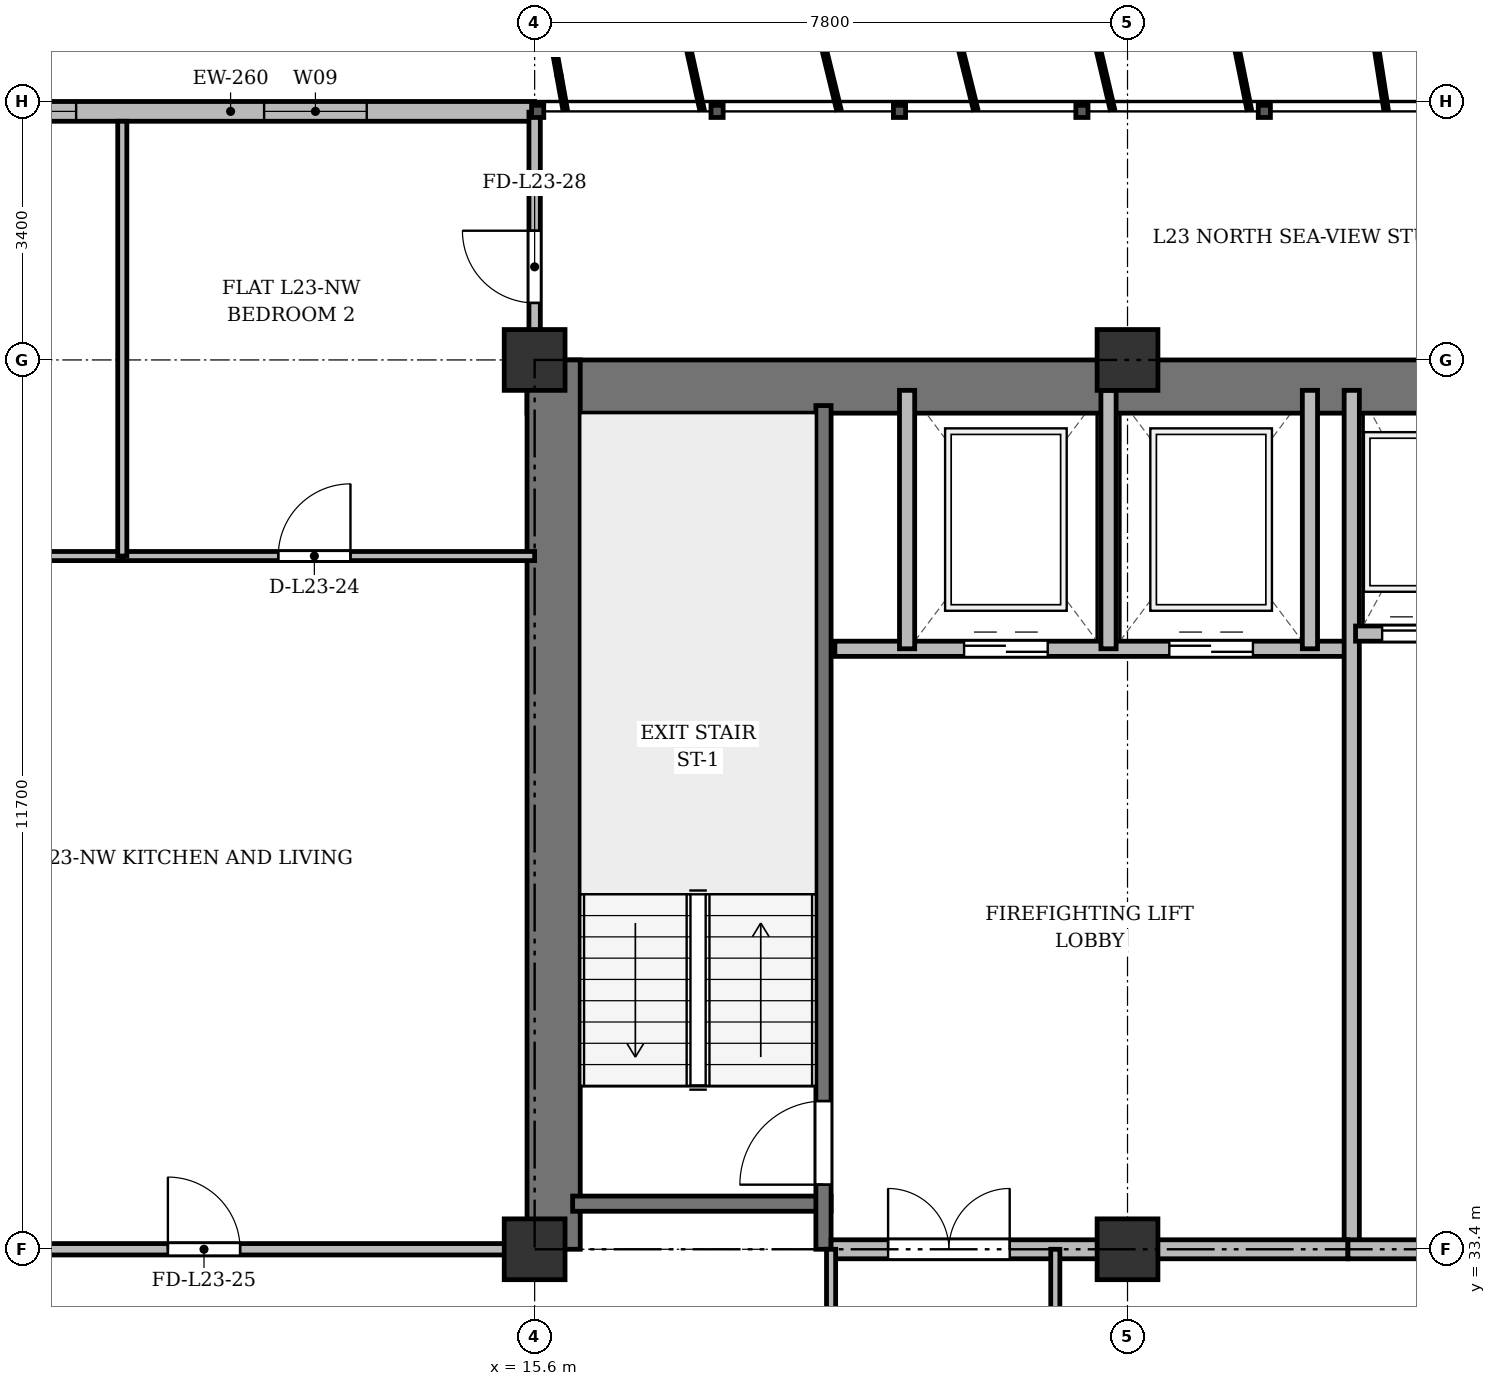
"""IFC4 building model, lengths in metres.
Left out: names, types, materials, properties, quantities, classifications, styles, units other than length and angle.
Written with IfcOpenShell. Run it as: python <this file> out.ifc"""

import sys

from ifc_helpers import new_model, si_unit, direction, frame, frame_2d, origin, origin_2d, place, context, subcontext, project, spatial, rectangle, extrude, source, transform, mapped, element, fill, save


model = new_model("IFC4")
c1 = context("Model", 3, precision=1e-05, world=origin(), true_north=direction((0.0, 1.0)))
c2 = subcontext(c1, "Body", "Model", "MODEL_VIEW")
j1 = project(units=[si_unit("LENGTHUNIT", "METRE"), si_unit("PLANEANGLEUNIT", "RADIAN")], contexts=[c1])
p1 = place(None, origin())
s1 = spatial("IfcSite", under=j1, at=p1, CompositionType="ELEMENT")
p2 = place(p1, origin())
s2 = spatial("IfcBuilding", under=s1, at=p2, CompositionType="ELEMENT")
p3 = place(p2, frame((0.0, 0.0, 92.5)))
s3 = spatial("IfcBuildingStorey", under=s2, at=p3, CompositionType="ELEMENT", Elevation=92.5)
m1 = source(origin(), c2, "Body", "SweptSolid", [
    extrude(rectangle(XDim=0.8, YDim=0.8, at=origin_2d()), origin(), (0.0, 0.0, 1.0), 3.6),
])
for number, where, z_axis, x_axis in (
    (1, (15.6, 33.4, 0.0), (0.0, 0.0, 1.0), (1.0, 0.0, 0.0)),
    (2, (15.6, 45.1, 0.0), (0.0, 0.0, 1.0), (1.0, 0.0, 0.0)),
    (3, (23.4, 33.4, 0.0), (0.0, 0.0, 1.0), (1.0, 0.0, 0.0)),
    (4, (23.4, 45.1, 0.0), (0.0, 0.0, 1.0), (1.0, 0.0, 0.0)),
):
    element("IfcColumn", number, at=place(p3, frame(where, z_axis=z_axis, x_axis=x_axis)), inside=s3, PredefinedType="COLUMN", context=c2, shape_type="MappedRepresentation", body=[
        mapped(m1, transform((0.0, 0.0, 0.0), x_axis=(1.0, 0.0, 0.0), y_axis=(0.0, 1.0, 0.0), z_axis=(0.0, 0.0, 1.0), scale=1.0)),
    ])
p4 = place(p3, frame((7.6, 48.37, 0.0), z_axis=(0.0, 0.0, 1.0), x_axis=(1.0, 0.0, 0.0)))
e5 = element("IfcWall", 5, at=p4, inside=s3, PredefinedType="SOLIDWALL", context=c2, shape_type="SweptSolid", body=[
    extrude(rectangle(XDim=8.0, YDim=0.26, at=frame_2d((4.0, 0.0))), origin(), (0.0, 0.0, 1.0), 3.34),
])
p5 = place(p4, frame((0.768, 0.0, 0.9)))
e6 = element("IfcOpeningElement", 6, at=p5, cuts=e5, PredefinedType="OPENING", context=c2, shape_type="SweptSolid", body=[
    extrude(rectangle(XDim=1.2, YDim=1.65, at=frame_2d((0.6, 0.825))), frame((0.0, 0.14, 0.0), z_axis=(0.0, -1.0, 0.0), x_axis=(1.0, 0.0, 0.0)), (0.0, 0.0, 1.0), 0.28),
])
p6 = place(p4, frame((4.441, 0.0, 0.9)))
e7 = element("IfcOpeningElement", 7, at=p6, cuts=e5, PredefinedType="OPENING", context=c2, shape_type="SweptSolid", body=[
    extrude(rectangle(XDim=1.35, YDim=1.5, at=frame_2d((0.675, 0.75))), frame((0.0, 0.14, 0.0), z_axis=(0.0, -1.0, 0.0), x_axis=(1.0, 0.0, 0.0)), (0.0, 0.0, 1.0), 0.28),
])
p7 = place(p3, frame((15.5, 44.75, 0.0), z_axis=(0.0, 0.0, 1.0), x_axis=(1.0, 0.0, 0.0)))
e8 = element("IfcWall", 8, at=p7, inside=s3, PredefinedType="SHEAR", context=c2, shape_type="SweptSolid", body=[
    extrude(rectangle(XDim=43.4, YDim=0.7, at=frame_2d((21.7, 0.0))), origin(), (0.0, 0.0, 1.0), 3.34),
])
p8 = place(p3, frame((15.85, 33.4, 0.0), z_axis=(0.0, 0.0, 1.0), x_axis=(0.0, 1.0, 0.0)))
e9 = element("IfcWall", 9, at=p8, inside=s3, PredefinedType="SHEAR", context=c2, shape_type="SweptSolid", body=[
    extrude(rectangle(XDim=11.7, YDim=0.7, at=frame_2d((5.85, 0.0))), origin(), (0.0, 0.0, 1.0), 3.34),
])
p9 = place(p3, frame((16.1, 34.0, 0.0), z_axis=(0.0, 0.0, 1.0), x_axis=(1.0, 0.0, 0.0)))
e10 = element("IfcWall", 10, at=p9, inside=s3, PredefinedType="SHEAR", context=c2, shape_type="SweptSolid", body=[
    extrude(rectangle(XDim=3.4, YDim=0.2, at=frame_2d((1.7, 0.0))), origin(), (0.0, 0.0, 1.0), 3.34),
])
p10 = place(p3, frame((19.4, 33.4, 0.0), z_axis=(0.0, 0.0, 1.0), x_axis=(0.0, 1.0, 0.0)))
e11 = element("IfcWall", 11, at=p10, inside=s3, PredefinedType="SHEAR", context=c2, shape_type="SweptSolid", body=[
    extrude(rectangle(XDim=11.1, YDim=0.2, at=frame_2d((5.55, 0.0))), origin(), (0.0, 0.0, 1.0), 3.34),
])
p11 = place(p10, frame((0.85, 0.0, 0.0)))
e12 = element("IfcOpeningElement", 12, at=p11, cuts=e11, PredefinedType="OPENING", context=c2, shape_type="SweptSolid", body=[
    extrude(rectangle(XDim=1.1, YDim=2.15, at=frame_2d((0.55, 1.075))), frame((0.0, 0.11, 0.0), z_axis=(0.0, -1.0, 0.0), x_axis=(1.0, 0.0, 0.0)), (0.0, 0.0, 1.0), 0.22),
])
p12 = place(p3, frame((19.55, 41.3, 0.0), z_axis=(0.0, 0.0, 1.0), x_axis=(1.0, 0.0, 0.0)))
e13 = element("IfcWall", 13, at=p12, inside=s3, PredefinedType="SOLIDWALL", context=c2, shape_type="SweptSolid", body=[
    extrude(rectangle(XDim=6.75, YDim=0.2, at=frame_2d((3.375, 0.0))), origin(), (0.0, 0.0, 1.0), 3.34),
])
p13 = place(p12, frame((1.7, 0.0, 0.0)))
e14 = element("IfcOpeningElement", 14, at=p13, cuts=e13, PredefinedType="OPENING", context=c2, shape_type="SweptSolid", body=[
    extrude(rectangle(XDim=1.1, YDim=2.15, at=frame_2d((0.55, 1.075))), frame((0.0, 0.11, 0.0), z_axis=(0.0, -1.0, 0.0), x_axis=(1.0, 0.0, 0.0)), (0.0, 0.0, 1.0), 0.22),
])
p14 = place(p12, frame((4.4, 0.0, 0.0)))
e15 = element("IfcOpeningElement", 15, at=p14, cuts=e13, PredefinedType="OPENING", context=c2, shape_type="SweptSolid", body=[
    extrude(rectangle(XDim=1.1, YDim=2.15, at=frame_2d((0.55, 1.075))), frame((0.0, 0.11, 0.0), z_axis=(0.0, -1.0, 0.0), x_axis=(1.0, 0.0, 0.0)), (0.0, 0.0, 1.0), 0.22),
])
for number, where, z_axis, x_axis in (
    (16, (20.5, 41.3, 0.0), (0.0, 0.0, 1.0), (0.0, 1.0, 0.0)),
    (17, (23.15, 41.3, 0.0), (0.0, 0.0, 1.0), (0.0, 1.0, 0.0)),
    (18, (25.8, 41.3, 0.0), (0.0, 0.0, 1.0), (0.0, 1.0, 0.0)),
):
    element("IfcWall", number, at=place(p3, frame(where, z_axis=z_axis, x_axis=x_axis)), inside=s3, PredefinedType="SOLIDWALL", context=c2, shape_type="SweptSolid", body=[
        extrude(rectangle(XDim=3.4, YDim=0.2, at=frame_2d((1.7, 0.0))), origin(), (0.0, 0.0, 1.0), 3.34),
    ])
p15 = place(p3, frame((26.35, 33.4, 0.0), z_axis=(0.0, 0.0, 1.0), x_axis=(0.0, 1.0, 0.0)))
e19 = element("IfcWall", 19, at=p15, inside=s3, PredefinedType="SOLIDWALL", context=c2, shape_type="SweptSolid", body=[
    extrude(rectangle(XDim=11.3, YDim=0.2, at=frame_2d((5.65, 0.0))), origin(), (0.0, 0.0, 1.0), 2.752),
])
p16 = place(p3, frame((19.5, 33.4, 0.0), z_axis=(0.0, 0.0, 1.0), x_axis=(1.0, 0.0, 0.0)))
e20 = element("IfcWall", 20, at=p16, inside=s3, PredefinedType="PARTITIONING", context=c2, shape_type="SweptSolid", body=[
    extrude(rectangle(XDim=6.8, YDim=0.25, at=frame_2d((3.4, 0.0))), origin(), (0.0, 0.0, 1.0), 2.752),
])
p17 = place(p16, frame((0.75, 0.0, 0.0)))
e21 = element("IfcOpeningElement", 21, at=p17, cuts=e20, PredefinedType="OPENING", context=c2, shape_type="SweptSolid", body=[
    extrude(rectangle(XDim=1.6, YDim=2.2, at=frame_2d((0.8, 1.1))), frame((0.0, 0.135, 0.0), z_axis=(0.0, -1.0, 0.0), x_axis=(1.0, 0.0, 0.0)), (0.0, 0.0, 1.0), 0.27),
])
p18 = place(p3, frame((26.4, 41.5, 0.0), z_axis=(0.0, 0.0, 1.0), x_axis=(1.0, 0.0, 0.0)))
e22 = element("IfcWall", 22, at=p18, inside=s3, PredefinedType="SOLIDWALL", context=c2, shape_type="SweptSolid", body=[
    extrude(rectangle(XDim=6.95, YDim=0.2, at=frame_2d((3.475, 0.0))), origin(), (0.0, 0.0, 1.0), 3.34),
])
p19 = place(p18, frame((0.35, 0.0, 0.0)))
e23 = element("IfcOpeningElement", 23, at=p19, cuts=e22, PredefinedType="OPENING", context=c2, shape_type="SweptSolid", body=[
    extrude(rectangle(XDim=1.05, YDim=2.15, at=frame_2d((0.525, 1.075))), frame((0.0, 0.11, 0.0), z_axis=(0.0, -1.0, 0.0), x_axis=(1.0, 0.0, 0.0)), (0.0, 0.0, 1.0), 0.22),
])
p20 = place(p18, frame((2.05, 0.0, 0.0)))
e24 = element("IfcOpeningElement", 24, at=p20, cuts=e22, PredefinedType="OPENING", context=c2, shape_type="SweptSolid", body=[
    extrude(rectangle(XDim=1.05, YDim=2.15, at=frame_2d((0.525, 1.075))), frame((0.0, 0.11, 0.0), z_axis=(0.0, -1.0, 0.0), x_axis=(1.0, 0.0, 0.0)), (0.0, 0.0, 1.0), 0.22),
])
p21 = place(p18, frame((3.75, 0.0, 0.0)))
e25 = element("IfcOpeningElement", 25, at=p21, cuts=e22, PredefinedType="OPENING", context=c2, shape_type="SweptSolid", body=[
    extrude(rectangle(XDim=1.05, YDim=2.15, at=frame_2d((0.525, 1.075))), frame((0.0, 0.11, 0.0), z_axis=(0.0, -1.0, 0.0), x_axis=(1.0, 0.0, 0.0)), (0.0, 0.0, 1.0), 0.22),
])
p22 = place(p18, frame((5.45, 0.0, 0.0)))
e26 = element("IfcOpeningElement", 26, at=p22, cuts=e22, PredefinedType="OPENING", context=c2, shape_type="SweptSolid", body=[
    extrude(rectangle(XDim=1.05, YDim=2.15, at=frame_2d((0.525, 1.075))), frame((0.0, 0.11, 0.0), z_axis=(0.0, -1.0, 0.0), x_axis=(1.0, 0.0, 0.0)), (0.0, 0.0, 1.0), 0.22),
])
p23 = place(p3, frame((26.3, 33.4, 0.0), z_axis=(0.0, 0.0, 1.0), x_axis=(1.0, 0.0, 0.0)))
e27 = element("IfcWall", 27, at=p23, inside=s3, PredefinedType="PARTITIONING", context=c2, shape_type="SweptSolid", body=[
    extrude(rectangle(XDim=20.85, YDim=0.25, at=frame_2d((10.425, 0.0))), origin(), (0.0, 0.0, 1.0), 2.752),
])
p24 = place(p23, frame((9.2, 0.0, 0.0)))
e28 = element("IfcOpeningElement", 28, at=p24, cuts=e27, PredefinedType="OPENING", context=c2, shape_type="SweptSolid", body=[
    extrude(rectangle(XDim=1.6, YDim=2.2, at=frame_2d((0.8, 1.1))), frame((0.0, 0.135, 0.0), z_axis=(0.0, -1.0, 0.0), x_axis=(1.0, 0.0, 0.0)), (0.0, 0.0, 1.0), 0.27),
])
for number, where, z_axis, x_axis in (
    (29, (19.5, 29.8, 0.0), (0.0, 0.0, 1.0), (0.0, 1.0, 0.0)),
    (30, (22.45, 29.8, 0.0), (0.0, 0.0, 1.0), (0.0, 1.0, 0.0)),
):
    element("IfcWall", number, at=place(p3, frame(where, z_axis=z_axis, x_axis=x_axis)), inside=s3, PredefinedType="PARTITIONING", context=c2, shape_type="SweptSolid", body=[
        extrude(rectangle(XDim=3.6, YDim=0.12, at=frame_2d((1.8, 0.0))), origin(), (0.0, 0.0, 1.0), 2.752),
    ])
p25 = place(p3, frame((4.75, 42.52, 0.0), z_axis=(0.0, 0.0, 1.0), x_axis=(1.0, 0.0, 0.0)))
e31 = element("IfcWall", 31, at=p25, inside=s3, PredefinedType="PARTITIONING", context=c2, shape_type="SweptSolid", body=[
    extrude(rectangle(XDim=5.425, YDim=0.12, at=frame_2d((2.712, 0.0))), origin(), (0.0, 0.0, 1.0), 2.84),
])
p26 = place(p25, frame((2.423, 0.0, 0.0)))
e32 = element("IfcOpeningElement", 32, at=p26, cuts=e31, PredefinedType="OPENING", context=c2, shape_type="SweptSolid", body=[
    extrude(rectangle(XDim=0.95, YDim=2.15, at=frame_2d((0.475, 1.075))), frame((0.0, 0.07, 0.0), z_axis=(0.0, -1.0, 0.0), x_axis=(1.0, 0.0, 0.0)), (0.0, 0.0, 1.0), 0.14),
])
p27 = place(p3, frame((10.175, 42.52, 0.0), z_axis=(0.0, 0.0, 1.0), x_axis=(1.0, 0.0, 0.0)))
e33 = element("IfcWall", 33, at=p27, inside=s3, PredefinedType="PARTITIONING", context=c2, shape_type="SweptSolid", body=[
    extrude(rectangle(XDim=5.425, YDim=0.12, at=frame_2d((2.712, 0.0))), origin(), (0.0, 0.0, 1.0), 2.84),
])
p28 = place(p27, frame((2.052, 0.0, 0.0)))
e34 = element("IfcOpeningElement", 34, at=p28, cuts=e33, PredefinedType="OPENING", context=c2, shape_type="SweptSolid", body=[
    extrude(rectangle(XDim=0.95, YDim=2.15, at=frame_2d((0.475, 1.075))), frame((0.0, 0.07, 0.0), z_axis=(0.0, -1.0, 0.0), x_axis=(1.0, 0.0, 0.0)), (0.0, 0.0, 1.0), 0.14),
])
p29 = place(p3, frame((10.175, 42.52, 0.0), z_axis=(0.0, 0.0, 1.0), x_axis=(0.0, 1.0, 0.0)))
e35 = element("IfcWall", 35, at=p29, inside=s3, PredefinedType="PARTITIONING", context=c2, shape_type="SweptSolid", body=[
    extrude(rectangle(XDim=5.72, YDim=0.12, at=frame_2d((2.86, 0.0))), origin(), (0.0, 0.0, 1.0), 2.752),
])
p30 = place(p3, frame((4.75, 33.4, 0.0), z_axis=(0.0, 0.0, 1.0), x_axis=(1.0, 0.0, 0.0)))
e36 = element("IfcWall", 36, at=p30, inside=s3, PredefinedType="PARTITIONING", context=c2, shape_type="SweptSolid", body=[
    extrude(rectangle(XDim=10.85, YDim=0.15, at=frame_2d((5.425, 0.0))), origin(), (0.0, 0.0, 1.0), 2.752),
])
p31 = place(p30, frame((6.025, 0.0, 0.0)))
e37 = element("IfcOpeningElement", 37, at=p31, cuts=e36, PredefinedType="OPENING", context=c2, shape_type="SweptSolid", body=[
    extrude(rectangle(XDim=0.95, YDim=2.15, at=frame_2d((0.475, 1.075))), frame((0.0, 0.085, 0.0), z_axis=(0.0, -1.0, 0.0), x_axis=(1.0, 0.0, 0.0)), (0.0, 0.0, 1.0), 0.17),
])
p32 = place(p3, frame((15.6, 44.75, 0.0), z_axis=(0.0, 0.0, 1.0), x_axis=(0.0, 1.0, 0.0)))
e38 = element("IfcWall", 38, at=p32, inside=s3, PredefinedType="PARTITIONING", context=c2, shape_type="SweptSolid", body=[
    extrude(rectangle(XDim=3.61, YDim=0.15, at=frame_2d((1.805, 0.0))), origin(), (0.0, 0.0, 1.0), 2.84),
])
p33 = place(p32, frame((1.1, 0.0, 0.0)))
e39 = element("IfcOpeningElement", 39, at=p33, cuts=e38, PredefinedType="OPENING", context=c2, shape_type="SweptSolid", body=[
    extrude(rectangle(XDim=0.95, YDim=2.15, at=frame_2d((0.475, 1.075))), frame((0.0, 0.085, 0.0), z_axis=(0.0, -1.0, 0.0), x_axis=(1.0, 0.0, 0.0)), (0.0, 0.0, 1.0), 0.17),
])
m2 = source(origin(), c2, "Body", "SweptSolid", [
    extrude(rectangle(XDim=1.2, YDim=1.65, at=frame_2d((0.6, 0.825))), frame((0.0, 0.03, 0.0), z_axis=(0.0, -1.0, 0.0), x_axis=(1.0, 0.0, 0.0)), (0.0, 0.0, 1.0), 0.06),
])
p34 = place(p5, origin())
e40 = element("IfcWindow", 40, at=p34, inside=s3, PartitioningType="SINGLE_PANEL", PredefinedType="WINDOW", context=c2, shape_type="MappedRepresentation", body=[
    mapped(m2, transform((0.0, 0.0, 0.0), x_axis=(1.0, 0.0, 0.0), y_axis=(0.0, 1.0, 0.0), z_axis=(0.0, 0.0, 1.0), scale=1.0)),
])
fill(e6, e40)
m3 = source(origin(), c2, "Body", "SweptSolid", [
    extrude(rectangle(XDim=1.35, YDim=1.5, at=frame_2d((0.675, 0.75))), frame((0.0, 0.03, 0.0), z_axis=(0.0, -1.0, 0.0), x_axis=(1.0, 0.0, 0.0)), (0.0, 0.0, 1.0), 0.06),
])
p35 = place(p6, origin())
e41 = element("IfcWindow", 41, at=p35, inside=s3, PartitioningType="SINGLE_PANEL", PredefinedType="WINDOW", context=c2, shape_type="MappedRepresentation", body=[
    mapped(m3, transform((0.0, 0.0, 0.0), x_axis=(1.0, 0.0, 0.0), y_axis=(0.0, 1.0, 0.0), z_axis=(0.0, 0.0, 1.0), scale=1.0)),
])
fill(e7, e41)
m4 = source(origin(), c2, "Body", "SweptSolid", [
    extrude(rectangle(XDim=1.1, YDim=2.15, at=frame_2d((0.55, 1.075))), frame((0.0, 0.025, 0.0), z_axis=(0.0, -1.0, 0.0), x_axis=(1.0, 0.0, 0.0)), (0.0, 0.0, 1.0), 0.05),
])
p36 = place(p11, origin())
e42 = element("IfcDoor", 42, at=p36, inside=s3, OperationType="SINGLE_SWING_LEFT", PredefinedType="DOOR", context=c2, shape_type="MappedRepresentation", body=[
    mapped(m4, transform((0.0, 0.0, 0.0), x_axis=(1.0, 0.0, 0.0), y_axis=(0.0, 1.0, 0.0), z_axis=(0.0, 0.0, 1.0), scale=1.0)),
])
fill(e12, e42)
p37 = place(p13, origin())
e43 = element("IfcDoor", 43, at=p37, inside=s3, OperationType="DOUBLE_DOOR_SLIDING", PredefinedType="DOOR", context=c2, shape_type="MappedRepresentation", body=[
    mapped(m4, transform((0.0, 0.0, 0.0), x_axis=(1.0, 0.0, 0.0), y_axis=(0.0, 1.0, 0.0), z_axis=(0.0, 0.0, 1.0), scale=1.0)),
])
fill(e14, e43)
p38 = place(p14, origin())
e44 = element("IfcDoor", 44, at=p38, inside=s3, OperationType="DOUBLE_DOOR_SLIDING", PredefinedType="DOOR", context=c2, shape_type="MappedRepresentation", body=[
    mapped(m4, transform((0.0, 0.0, 0.0), x_axis=(1.0, 0.0, 0.0), y_axis=(0.0, 1.0, 0.0), z_axis=(0.0, 0.0, 1.0), scale=1.0)),
])
fill(e15, e44)
m5 = source(origin(), c2, "Body", "SweptSolid", [
    extrude(rectangle(XDim=1.6, YDim=2.2, at=frame_2d((0.8, 1.1))), frame((0.0, 0.025, 0.0), z_axis=(0.0, -1.0, 0.0), x_axis=(1.0, 0.0, 0.0)), (0.0, 0.0, 1.0), 0.05),
])
p39 = place(p17, origin())
e45 = element("IfcDoor", 45, at=p39, inside=s3, OperationType="DOUBLE_DOOR_SINGLE_SWING", PredefinedType="DOOR", context=c2, shape_type="MappedRepresentation", body=[
    mapped(m5, transform((0.0, 0.0, 0.0), x_axis=(1.0, 0.0, 0.0), y_axis=(0.0, 1.0, 0.0), z_axis=(0.0, 0.0, 1.0), scale=1.0)),
])
fill(e21, e45)
m6 = source(origin(), c2, "Body", "SweptSolid", [
    extrude(rectangle(XDim=1.05, YDim=2.15, at=frame_2d((0.525, 1.075))), frame((0.0, 0.025, 0.0), z_axis=(0.0, -1.0, 0.0), x_axis=(1.0, 0.0, 0.0)), (0.0, 0.0, 1.0), 0.05),
])
p40 = place(p19, origin())
e46 = element("IfcDoor", 46, at=p40, inside=s3, OperationType="DOUBLE_DOOR_SLIDING", PredefinedType="DOOR", context=c2, shape_type="MappedRepresentation", body=[
    mapped(m6, transform((0.0, 0.0, 0.0), x_axis=(1.0, 0.0, 0.0), y_axis=(0.0, 1.0, 0.0), z_axis=(0.0, 0.0, 1.0), scale=1.0)),
])
fill(e23, e46)
m7 = source(origin(), c2, "Body", "SweptSolid", [
    extrude(rectangle(XDim=0.95, YDim=2.15, at=frame_2d((0.475, 1.075))), frame((0.0, 0.025, 0.0), z_axis=(0.0, -1.0, 0.0), x_axis=(1.0, 0.0, 0.0)), (0.0, 0.0, 1.0), 0.05),
])
p41 = place(p28, origin())
e47 = element("IfcDoor", 47, at=p41, inside=s3, OperationType="SINGLE_SWING_RIGHT", PredefinedType="DOOR", context=c2, shape_type="MappedRepresentation", body=[
    mapped(m7, transform((0.0, 0.0, 0.0), x_axis=(1.0, 0.0, 0.0), y_axis=(0.0, 1.0, 0.0), z_axis=(0.0, 0.0, 1.0), scale=1.0)),
])
fill(e34, e47)
p42 = place(p31, origin())
e48 = element("IfcDoor", 48, at=p42, inside=s3, OperationType="SINGLE_SWING_LEFT", PredefinedType="DOOR", context=c2, shape_type="MappedRepresentation", body=[
    mapped(m7, transform((0.0, 0.0, 0.0), x_axis=(1.0, 0.0, 0.0), y_axis=(0.0, 1.0, 0.0), z_axis=(0.0, 0.0, 1.0), scale=1.0)),
])
fill(e37, e48)
p43 = place(p33, origin())
e49 = element("IfcDoor", 49, at=p43, inside=s3, OperationType="SINGLE_SWING_RIGHT", PredefinedType="DOOR", context=c2, shape_type="MappedRepresentation", body=[
    mapped(m7, transform((0.0, 0.0, 0.0), x_axis=(1.0, 0.0, 0.0), y_axis=(0.0, 1.0, 0.0), z_axis=(0.0, 0.0, 1.0), scale=1.0)),
])
fill(e39, e49)
save(model, sys.argv[1])
